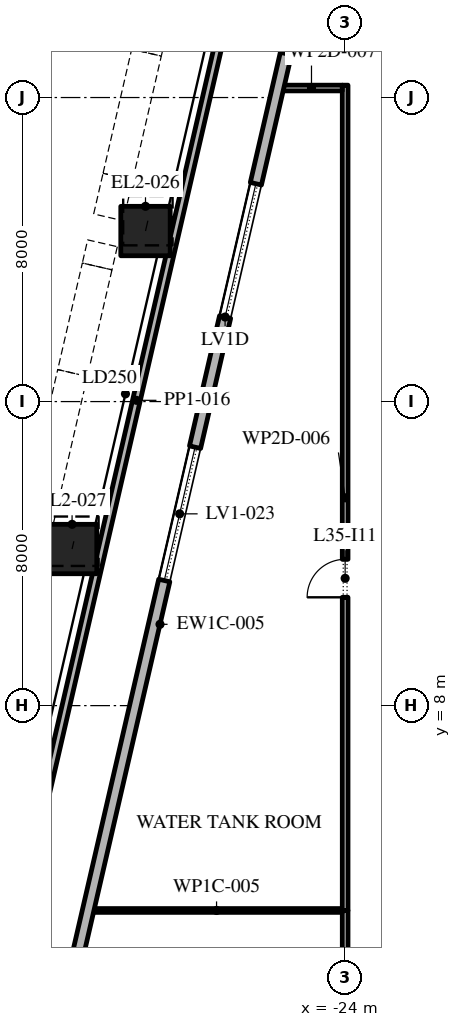
"""IFC4 building model, lengths in metres.
Left out: names, types, materials, properties, quantities, classifications, styles, units other than length and angle.
Written with IfcOpenShell. Run it as: python <this file> out.ifc"""

import sys

from ifc_helpers import new_model, si_unit, direction, frame, frame_2d, origin, origin_2d, place, context, subcontext, project, spatial, rectangle, extrude, element, fill, save


model = new_model("IFC4")
c1 = context("Model", 3, precision=1e-05, world=origin(), true_north=direction((0.0, 1.0)))
c2 = subcontext(c1, "Body", "Model", "MODEL_VIEW")
j1 = project(units=[si_unit("LENGTHUNIT", "METRE"), si_unit("PLANEANGLEUNIT", "RADIAN")], contexts=[c1])
p1 = place(None, origin())
s1 = spatial("IfcSite", under=j1, at=p1, CompositionType="ELEMENT")
p2 = place(p1, origin())
s2 = spatial("IfcBuilding", under=s1, at=p2, CompositionType="ELEMENT")
p3 = place(p2, frame((0.0, 0.0, 160.2)))
s3 = spatial("IfcBuildingStorey", under=s2, at=p3, CompositionType="ELEMENT", Elevation=160.2)
p4 = place(p3, frame((-29.253, 20.487, 0.0), z_axis=(0.011693608354, 0.050566955043, 0.998652213026), x_axis=(-0.974288465505, 0.225304207648, 0.0)))
e1 = element("IfcColumn", 1, at=p4, inside=s3, PredefinedType="COLUMN", context=c2, shape_type="SweptSolid", body=[
    extrude(rectangle(XDim=1.3, YDim=1.3, at=origin_2d()), origin(), (0.0, 0.0, 1.0), 5.407),
])
p5 = place(p3, frame((-31.185, 12.12, 0.0), z_axis=(0.008764085709, 0.037947587604, 0.999241297884), x_axis=(-0.974352081763, 0.225028933169, 0.0)))
e2 = element("IfcColumn", 2, at=p5, inside=s3, PredefinedType="COLUMN", context=c2, shape_type="SweptSolid", body=[
    extrude(rectangle(XDim=1.3, YDim=1.3, at=origin_2d()), origin(), (0.0, 0.0, 1.0), 5.404),
])
p6 = place(p3, frame((-22.904, 44.567, -0.05), z_axis=(0.0, 0.0, 1.0), x_axis=(-0.224953271822, -0.974369552837, 0.0)))
e3 = element("IfcWall", 3, at=p6, inside=s3, PredefinedType="STANDARD", context=c2, shape_type="SweptSolid", body=[
    extrude(rectangle(XDim=58.569, YDim=0.2, at=frame_2d((29.285, 0.0))), origin(), (0.0, 0.0, 1.0), 1.1),
])
p7 = place(p3, frame((-24.0, -4.32, 0.0), z_axis=(0.0, 0.0, 1.0), x_axis=(0.0, 1.0, 0.0)))
e4 = element("IfcWall", 4, at=p7, inside=s3, PredefinedType="PARTITIONING", context=c2, shape_type="SweptSolid", body=[
    extrude(rectangle(XDim=6.93, YDim=0.15, at=frame_2d((3.465, 0.0))), origin(), (0.0, 0.0, 1.0), 4.95),
])
p8 = place(p7, frame((3.03, 0.0, 0.0)))
e5 = element("IfcOpeningElement", 5, at=p8, cuts=e4, PredefinedType="OPENING", context=c2, shape_type="SweptSolid", body=[
    extrude(rectangle(XDim=1.0, YDim=2.1, at=frame_2d((0.5, 1.05))), frame((0.0, 0.085, 0.0), z_axis=(0.0, -1.0, 0.0), x_axis=(1.0, 0.0, 0.0)), (0.0, 0.0, 1.0), 0.17),
])
p9 = place(p3, frame((-24.075, 2.61, 0.0), z_axis=(0.0, 0.0, 1.0), x_axis=(-1.0, 0.0, 0.0)))
e6 = element("IfcWall", 6, at=p9, inside=s3, PredefinedType="PARTITIONING", context=c2, shape_type="SweptSolid", body=[
    extrude(rectangle(XDim=6.617, YDim=0.1, at=frame_2d((3.309, 0.0))), origin(), (0.0, 0.0, 1.0), 4.95),
])
p10 = place(p3, frame((-24.0, 2.61, 0.0), z_axis=(0.0, 0.0, 1.0), x_axis=(0.0, 1.0, 0.0)))
e7 = element("IfcWall", 7, at=p10, inside=s3, PredefinedType="PARTITIONING", context=c2, shape_type="SweptSolid", body=[
    extrude(rectangle(XDim=21.715, YDim=0.15, at=frame_2d((10.857, 0.0))), origin(), (0.0, 0.0, 1.0), 4.95),
])
p11 = place(p10, frame((8.24, 0.0, 0.0)))
e8 = element("IfcOpeningElement", 8, at=p11, cuts=e7, PredefinedType="OPENING", context=c2, shape_type="SweptSolid", body=[
    extrude(rectangle(XDim=1.0, YDim=2.1, at=frame_2d((0.5, 1.05))), frame((0.0, 0.085, 0.0), z_axis=(0.0, -1.0, 0.0), x_axis=(1.0, 0.0, 0.0)), (0.0, 0.0, 1.0), 0.17),
])
p12 = place(p3, frame((-24.075, 24.25, 0.0), z_axis=(0.0, 0.0, 1.0), x_axis=(-1.0, 0.0, 0.0)))
e9 = element("IfcWall", 9, at=p12, inside=s3, PredefinedType="PARTITIONING", context=c2, shape_type="SweptSolid", body=[
    extrude(rectangle(XDim=1.621, YDim=0.15, at=frame_2d((0.811, 0.0))), origin(), (0.0, 0.0, 1.0), 4.95),
])
p13 = place(p3, frame((-24.08, 31.562, 0.0), z_axis=(0.0, 0.0, 1.0), x_axis=(-0.224949667351, -0.974370384997, 0.0)))
e10 = element("IfcWall", 10, at=p13, inside=s3, PredefinedType="STANDARD", context=c2, shape_type="SweptSolid", body=[
    extrude(rectangle(XDim=43.903, YDim=0.3, at=frame_2d((21.952, 0.0))), origin(), (0.0, 0.0, 1.0), 4.95),
])
p14 = place(p13, frame((2.974, 0.0, 0.6)))
e11 = element("IfcOpeningElement", 11, at=p14, cuts=e10, PredefinedType="OPENING", context=c2, shape_type="SweptSolid", body=[
    extrude(rectangle(XDim=3.6, YDim=3.475, at=frame_2d((1.8, 1.738))), frame((0.0, 0.16, 0.0), z_axis=(0.0, -1.0, 0.0), x_axis=(1.0, 0.0, 0.0)), (0.0, 0.0, 1.0), 0.32),
])
p15 = place(p13, frame((10.089, 0.0, 0.6)))
e12 = element("IfcOpeningElement", 12, at=p15, cuts=e10, PredefinedType="OPENING", context=c2, shape_type="SweptSolid", body=[
    extrude(rectangle(XDim=3.6, YDim=3.625, at=frame_2d((1.8, 1.812))), frame((0.0, 0.16, 0.0), z_axis=(0.0, -1.0, 0.0), x_axis=(1.0, 0.0, 0.0)), (0.0, 0.0, 1.0), 0.32),
])
p16 = place(p13, frame((17.203, 0.0, 0.6)))
e13 = element("IfcOpeningElement", 13, at=p16, cuts=e10, PredefinedType="OPENING", context=c2, shape_type="SweptSolid", body=[
    extrude(rectangle(XDim=3.6, YDim=3.9, at=frame_2d((1.8, 1.95))), frame((0.0, 0.16, 0.0), z_axis=(0.0, -1.0, 0.0), x_axis=(1.0, 0.0, 0.0)), (0.0, 0.0, 1.0), 0.32),
])
p17 = place(p14, origin())
e14 = element("IfcWindow", 14, at=p17, inside=s3, PartitioningType="DOUBLE_PANEL_HORIZONTAL", PredefinedType="WINDOW", context=c2, shape_type="SweptSolid", body=[
    extrude(rectangle(XDim=3.6, YDim=3.475, at=frame_2d((1.8, 1.738))), frame((0.0, 0.03, 0.0), z_axis=(0.0, -1.0, 0.0), x_axis=(1.0, 0.0, 0.0)), (0.0, 0.0, 1.0), 0.06),
])
fill(e11, e14)
p18 = place(p15, origin())
e15 = element("IfcWindow", 15, at=p18, inside=s3, PartitioningType="DOUBLE_PANEL_HORIZONTAL", PredefinedType="WINDOW", context=c2, shape_type="SweptSolid", body=[
    extrude(rectangle(XDim=3.6, YDim=3.625, at=frame_2d((1.8, 1.812))), frame((0.0, 0.03, 0.0), z_axis=(0.0, -1.0, 0.0), x_axis=(1.0, 0.0, 0.0)), (0.0, 0.0, 1.0), 0.06),
])
fill(e12, e15)
p19 = place(p16, origin())
e16 = element("IfcWindow", 16, at=p19, inside=s3, PartitioningType="DOUBLE_PANEL_HORIZONTAL", PredefinedType="WINDOW", context=c2, shape_type="SweptSolid", body=[
    extrude(rectangle(XDim=3.6, YDim=3.9, at=frame_2d((1.8, 1.95))), frame((0.0, 0.03, 0.0), z_axis=(0.0, -1.0, 0.0), x_axis=(1.0, 0.0, 0.0)), (0.0, 0.0, 1.0), 0.06),
])
fill(e13, e16)
p20 = place(p11, origin())
e17 = element("IfcDoor", 17, at=p20, inside=s3, OperationType="SINGLE_SWING_RIGHT", PredefinedType="DOOR", context=c2, shape_type="SweptSolid", body=[
    extrude(rectangle(XDim=1.0, YDim=2.1, at=frame_2d((0.5, 1.05))), frame((0.0, 0.025, 0.0), z_axis=(0.0, -1.0, 0.0), x_axis=(1.0, 0.0, 0.0)), (0.0, 0.0, 1.0), 0.05),
])
fill(e8, e17)
save(model, sys.argv[1])
